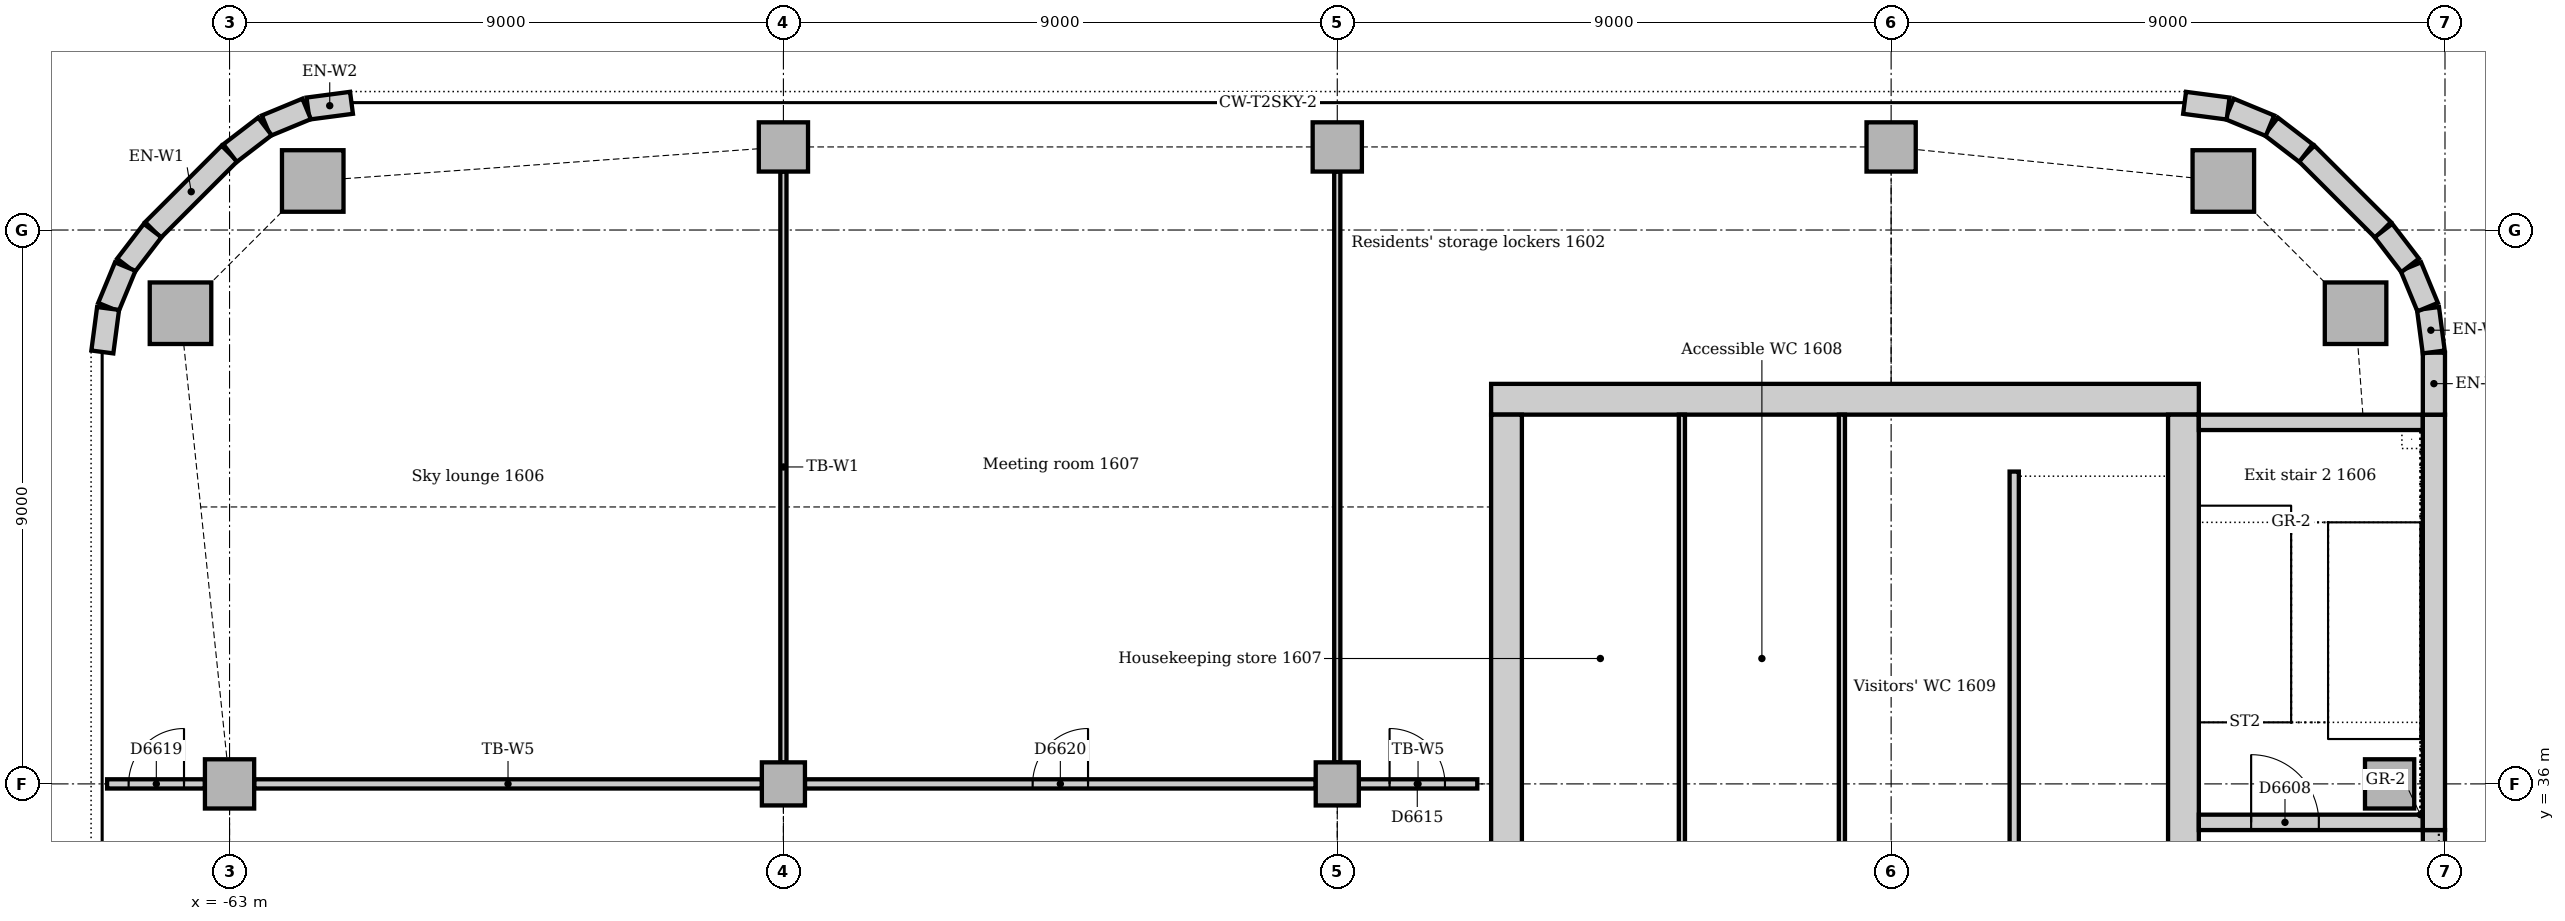
"""IFC4 building model, lengths in metres.
Left out: names, types, materials, properties, quantities, classifications, styles, units other than length and angle.
Written with IfcOpenShell. Run it as: python <this file> out.ifc"""

import sys

from ifc_helpers import new_model, si_unit, direction, frame, frame_2d, origin, origin_2d, place, context, subcontext, project, spatial, rectangle, extrude, element, fill, save


model = new_model("IFC4")
c1 = context("Model", 3, precision=1e-05, world=origin(), true_north=direction((0.0, 1.0)))
c2 = subcontext(c1, "Body", "Model", "MODEL_VIEW")
j1 = project(units=[si_unit("LENGTHUNIT", "METRE"), si_unit("PLANEANGLEUNIT", "RADIAN")], contexts=[c1])
p1 = place(None, origin())
s1 = spatial("IfcSite", under=j1, at=p1, CompositionType="ELEMENT")
p2 = place(p1, origin())
s2 = spatial("IfcBuilding", under=s1, at=p2, CompositionType="ELEMENT")
p3 = place(p2, frame((0.0, 0.0, 71.0)))
s3 = spatial("IfcBuildingStorey", under=s2, at=p3, CompositionType="ELEMENT", Elevation=71.0)
p4 = place(p3, frame((-31.0, 42.25, 0.0), z_axis=(0.0, 0.0, 1.0), x_axis=(-1.0, 0.0, 0.0)))
e1 = element("IfcWall", 1, at=p4, inside=s3, PredefinedType="SOLIDWALL", context=c2, shape_type="SweptSolid", body=[
    extrude(rectangle(XDim=11.5, YDim=0.5, at=frame_2d((5.75, 0.0))), origin(), (0.0, 0.0, 1.0), 4.0),
])
p5 = place(p3, frame((-31.25, 30.5, 0.0), z_axis=(0.0, 0.0, 1.0), x_axis=(0.0, 1.0, 0.0)))
e2 = element("IfcWall", 2, at=p5, inside=s3, PredefinedType="SOLIDWALL", context=c2, shape_type="SweptSolid", body=[
    extrude(rectangle(XDim=11.5, YDim=0.5, at=frame_2d((5.75, 0.0))), origin(), (0.0, 0.0, 1.0), 4.0),
])
p6 = place(p5, frame((0.85, 0.0, 0.0)))
e3 = element("IfcOpeningElement", 3, at=p6, cuts=e2, PredefinedType="OPENING", context=c2, shape_type="SweptSolid", body=[
    extrude(rectangle(XDim=1.8, YDim=2.1, at=frame_2d((0.9, 1.05))), frame((0.0, 0.26, 0.0), z_axis=(0.0, -1.0, 0.0), x_axis=(1.0, 0.0, 0.0)), (0.0, 0.0, 1.0), 0.52),
])
p7 = place(p3, frame((-42.25, 42.0, 0.0), z_axis=(0.0, 0.0, 1.0), x_axis=(0.0, -1.0, 0.0)))
e4 = element("IfcWall", 4, at=p7, inside=s3, PredefinedType="SOLIDWALL", context=c2, shape_type="SweptSolid", body=[
    extrude(rectangle(XDim=11.5, YDim=0.5, at=frame_2d((5.75, 0.0))), origin(), (0.0, 0.0, 1.0), 4.0),
])
p8 = place(p7, frame((8.85, 0.0, 0.0)))
e5 = element("IfcOpeningElement", 5, at=p8, cuts=e4, PredefinedType="OPENING", context=c2, shape_type="SweptSolid", body=[
    extrude(rectangle(XDim=1.8, YDim=2.1, at=frame_2d((0.9, 1.05))), frame((0.0, 0.26, 0.0), z_axis=(0.0, -1.0, 0.0), x_axis=(1.0, 0.0, 0.0)), (0.0, 0.0, 1.0), 0.52),
])
p9 = place(p3, frame((-31.0, 35.375, 0.0), z_axis=(0.0, 0.0, 1.0), x_axis=(1.0, 0.0, 0.0)))
e6 = element("IfcWall", 6, at=p9, inside=s3, PredefinedType="SOLIDWALL", context=c2, shape_type="SweptSolid", body=[
    extrude(rectangle(XDim=3.64, YDim=0.25, at=frame_2d((1.82, 0.0))), origin(), (0.0, 0.0, 1.0), 4.0),
])
p10 = place(p9, frame((0.85, 0.0, 0.0)))
e7 = element("IfcOpeningElement", 7, at=p10, cuts=e6, PredefinedType="OPENING", context=c2, shape_type="SweptSolid", body=[
    extrude(rectangle(XDim=1.1, YDim=2.1, at=frame_2d((0.55, 1.05))), frame((0.0, 0.135, 0.0), z_axis=(0.0, -1.0, 0.0), x_axis=(1.0, 0.0, 0.0)), (0.0, 0.0, 1.0), 0.27),
])
p11 = place(p3, frame((-27.36, 41.875, 0.0), z_axis=(0.0, 0.0, 1.0), x_axis=(-1.0, 0.0, 0.0)))
e8 = element("IfcWall", 8, at=p11, inside=s3, PredefinedType="SOLIDWALL", context=c2, shape_type="SweptSolid", body=[
    extrude(rectangle(XDim=3.64, YDim=0.25, at=frame_2d((1.82, 0.0))), origin(), (0.0, 0.0, 1.0), 4.0),
])
for number, where, z_axis, x_axis in (
    (9, (-28.453, 43.648, 0.0), (0.0, 0.0, 1.0), (1.0, 0.0, 0.0)),
    (10, (-30.602, 45.797, 0.0), (0.0, 0.0, 1.0), (1.0, 0.0, 0.0)),
    (11, (-61.648, 45.797, 0.0), (0.0, 0.0, 1.0), (1.0, 0.0, 0.0)),
    (12, (-63.797, 43.648, 0.0), (0.0, 0.0, 1.0), (1.0, 0.0, 0.0)),
):
    element("IfcColumn", number, at=place(p3, frame(where, z_axis=z_axis, x_axis=x_axis)), inside=s3, PredefinedType="COLUMN", context=c2, shape_type="SweptSolid", body=[
        extrude(rectangle(XDim=1.0, YDim=1.0, at=origin_2d()), origin(), (0.0, 0.0, 1.0), 3.85),
    ])
p12 = place(p3, frame((-27.9, 36.0, 0.0), z_axis=(0.0, 0.0, 1.0), x_axis=(1.0, 0.0, 0.0)))
e13 = element("IfcColumn", 13, at=p12, inside=s3, PredefinedType="COLUMN", context=c2, shape_type="SweptSolid", body=[
    extrude(rectangle(XDim=0.8, YDim=0.8, at=origin_2d()), origin(), (0.0, 0.0, 1.0), 4.0),
])
for number, where, z_axis, x_axis in (
    (14, (-54.0, 46.35, 0.0), (0.0, 0.0, 1.0), (1.0, 0.0, 0.0)),
    (15, (-45.0, 46.35, 0.0), (0.0, 0.0, 1.0), (1.0, 0.0, 0.0)),
    (16, (-36.0, 46.35, 0.0), (0.0, 0.0, 1.0), (1.0, 0.0, 0.0)),
    (17, (-63.0, 36.0, 0.0), (0.0, 0.0, 1.0), (1.0, 0.0, 0.0)),
):
    element("IfcColumn", number, at=place(p3, frame(where, z_axis=z_axis, x_axis=x_axis)), inside=s3, PredefinedType="COLUMN", context=c2, shape_type="SweptSolid", body=[
        extrude(rectangle(XDim=0.8, YDim=0.8, at=origin_2d()), origin(), (0.0, 0.0, 1.0), 3.85),
    ])
for number, where, z_axis, x_axis in (
    (18, (-54.0, 36.0, 0.0), (0.0, 0.0, 1.0), (1.0, 0.0, 0.0)),
    (19, (-45.0, 36.0, 0.0), (0.0, 0.0, 1.0), (1.0, 0.0, 0.0)),
):
    element("IfcColumn", number, at=place(p3, frame(where, z_axis=z_axis, x_axis=x_axis)), inside=s3, PredefinedType="COLUMN", context=c2, shape_type="SweptSolid", body=[
        extrude(rectangle(XDim=0.7, YDim=0.7, at=origin_2d()), origin(), (0.0, 0.0, 1.0), 3.85),
    ])
p13 = place(p3, frame((-27.18, 34.5, 0.0), z_axis=(0.0, 0.0, 1.0), x_axis=(0.0, 1.0, 0.0)))
e20 = element("IfcWall", 20, at=p13, inside=s3, PredefinedType="STANDARD", context=c2, shape_type="SweptSolid", body=[
    extrude(rectangle(XDim=0.75, YDim=0.36, at=frame_2d((0.375, 0.0))), origin(), (0.0, 0.0, 1.0), 3.85),
])
p14 = place(p3, frame((-27.18, 35.25, 0.0), z_axis=(0.0, 0.0, 1.0), x_axis=(0.0, 1.0, 0.0)))
e21 = element("IfcWall", 21, at=p14, inside=s3, PredefinedType="STANDARD", context=c2, shape_type="SweptSolid", body=[
    extrude(rectangle(XDim=6.75, YDim=0.36, at=frame_2d((3.375, 0.0))), origin(), (0.0, 0.0, 1.0), 3.85),
])
p15 = place(p3, frame((-27.18, 42.0, 0.0), z_axis=(0.0, 0.0, 1.0), x_axis=(0.0, 1.0, 0.0)))
e22 = element("IfcWall", 22, at=p15, inside=s3, PredefinedType="STANDARD", context=c2, shape_type="SweptSolid", body=[
    extrude(rectangle(XDim=1.007, YDim=0.36, at=frame_2d((0.504, 0.0))), origin(), (0.0, 0.0, 1.0), 3.85),
])
for number, where, z_axis, x_axis in (
    (23, (-28.006, 45.001, 0.0), (0.0, 0.0, 1.0), (-0.707, 0.707, 0.0)),
    (24, (-63.001, 46.244, 0.0), (0.0, 0.0, 1.0), (-0.707, -0.707, 0.0)),
):
    element("IfcWall", number, at=place(p3, frame(where, z_axis=z_axis, x_axis=x_axis)), inside=s3, PredefinedType="STANDARD", context=c2, shape_type="SweptSolid", body=[
        extrude(rectangle(XDim=1.757, YDim=0.36, at=frame_2d((0.879, 0.0))), origin(), (0.0, 0.0, 1.0), 3.85),
    ])
for number, where, z_axis, x_axis in (
    (25, (-27.183, 43.019, 0.0), (0.0, 0.0, 1.0), (-0.131, 0.991, 0.0)),
    (26, (-27.282, 43.747, 0.0), (0.0, 0.0, 1.0), (-0.383, 0.924, 0.0)),
):
    element("IfcWall", number, at=place(p3, frame(where, z_axis=z_axis, x_axis=x_axis)), inside=s3, PredefinedType="STANDARD", context=c2, shape_type="SweptSolid", body=[
        extrude(rectangle(XDim=0.713, YDim=0.36, at=frame_2d((0.356, 0.0))), origin(), (0.0, 0.0, 1.0), 3.85),
    ])
for number, where, z_axis, x_axis in (
    (27, (-27.566, 44.425, 0.0), (0.0, 0.0, 1.0), (-0.609, 0.793, 0.0)),
    (28, (-29.259, 46.25, 0.0), (0.0, 0.0, 1.0), (-0.793, 0.609, 0.0)),
):
    element("IfcWall", number, at=place(p3, frame(where, z_axis=z_axis, x_axis=x_axis)), inside=s3, PredefinedType="STANDARD", context=c2, shape_type="SweptSolid", body=[
        extrude(rectangle(XDim=0.713, YDim=0.36, at=frame_2d((0.357, 0.0))), origin(), (0.0, 0.0, 1.0), 3.85),
    ])
for number, where, z_axis, x_axis in (
    (29, (-29.844, 46.695, 0.0), (0.0, 0.0, 1.0), (-0.924, 0.383, 0.0)),
    (30, (-30.524, 46.974, 0.0), (0.0, 0.0, 1.0), (-0.991, 0.131, 0.0)),
    (31, (-61.019, 47.067, 0.0), (0.0, 0.0, 1.0), (-0.991, -0.131, 0.0)),
    (32, (-61.747, 46.968, 0.0), (0.0, 0.0, 1.0), (-0.924, -0.383, 0.0)),
):
    element("IfcWall", number, at=place(p3, frame(where, z_axis=z_axis, x_axis=x_axis)), inside=s3, PredefinedType="STANDARD", context=c2, shape_type="SweptSolid", body=[
        extrude(rectangle(XDim=0.713, YDim=0.36, at=frame_2d((0.356, 0.0))), origin(), (0.0, 0.0, 1.0), 3.85),
    ])
for number, where, z_axis, x_axis in (
    (33, (-62.425, 46.684, 0.0), (0.0, 0.0, 1.0), (-0.793, -0.609, 0.0)),
    (34, (-64.25, 44.991, 0.0), (0.0, 0.0, 1.0), (-0.609, -0.793, 0.0)),
):
    element("IfcWall", number, at=place(p3, frame(where, z_axis=z_axis, x_axis=x_axis)), inside=s3, PredefinedType="STANDARD", context=c2, shape_type="SweptSolid", body=[
        extrude(rectangle(XDim=0.713, YDim=0.36, at=frame_2d((0.357, 0.0))), origin(), (0.0, 0.0, 1.0), 3.85),
    ])
for number, where, z_axis, x_axis in (
    (35, (-64.695, 44.406, 0.0), (0.0, 0.0, 1.0), (-0.383, -0.924, 0.0)),
    (36, (-64.974, 43.726, 0.0), (0.0, 0.0, 1.0), (-0.131, -0.991, 0.0)),
):
    element("IfcWall", number, at=place(p3, frame(where, z_axis=z_axis, x_axis=x_axis)), inside=s3, PredefinedType="STANDARD", context=c2, shape_type="SweptSolid", body=[
        extrude(rectangle(XDim=0.713, YDim=0.36, at=frame_2d((0.356, 0.0))), origin(), (0.0, 0.0, 1.0), 3.85),
    ])
p16 = place(p3, frame((-34.0, 41.075, 0.0), z_axis=(0.0, 0.0, 1.0), x_axis=(0.0, -1.0, 0.0)))
e37 = element("IfcWall", 37, at=p16, inside=s3, PredefinedType="SOLIDWALL", context=c2, shape_type="SweptSolid", body=[
    extrude(rectangle(XDim=7.0, YDim=0.15, at=frame_2d((3.5, 0.0))), origin(), (0.0, 0.0, 1.0), 4.0),
])
for number, where, z_axis, x_axis in (
    (38, (-39.4, 34.075, 0.0), (0.0, 0.0, 1.0), (0.0, 1.0, 0.0)),
    (39, (-36.8, 34.075, 0.0), (0.0, 0.0, 1.0), (0.0, 1.0, 0.0)),
):
    element("IfcWall", number, at=place(p3, frame(where, z_axis=z_axis, x_axis=x_axis)), inside=s3, PredefinedType="PARTITIONING", context=c2, shape_type="SweptSolid", body=[
        extrude(rectangle(XDim=7.925, YDim=0.1, at=frame_2d((3.962, 0.0))), origin(), (0.0, 0.0, 1.0), 3.85),
    ])
p17 = place(p3, frame((-44.65, 36.0, 0.0), z_axis=(0.0, 0.0, 1.0), x_axis=(1.0, 0.0, 0.0)))
e40 = element("IfcWall", 40, at=p17, inside=s3, PredefinedType="PARTITIONING", context=c2, shape_type="SweptSolid", body=[
    extrude(rectangle(XDim=1.925, YDim=0.15, at=frame_2d((0.963, 0.0))), origin(), (0.0, 0.0, 1.0), 3.602),
])
p18 = place(p17, frame((0.5, 0.0, 0.0)))
e41 = element("IfcOpeningElement", 41, at=p18, cuts=e40, PredefinedType="OPENING", context=c2, shape_type="SweptSolid", body=[
    extrude(rectangle(XDim=0.9, YDim=2.1, at=frame_2d((0.45, 1.05))), frame((0.0, 0.085, 0.0), z_axis=(0.0, -1.0, 0.0), x_axis=(1.0, 0.0, 0.0)), (0.0, 0.0, 1.0), 0.17),
])
p19 = place(p3, frame((-53.65, 36.0, 0.0), z_axis=(0.0, 0.0, 1.0), x_axis=(1.0, 0.0, 0.0)))
e42 = element("IfcWall", 42, at=p19, inside=s3, PredefinedType="PARTITIONING", context=c2, shape_type="SweptSolid", body=[
    extrude(rectangle(XDim=8.3, YDim=0.15, at=frame_2d((4.15, 0.0))), origin(), (0.0, 0.0, 1.0), 3.158),
])
p20 = place(p19, frame((3.7, 0.0, 0.0)))
e43 = element("IfcOpeningElement", 43, at=p20, cuts=e42, PredefinedType="OPENING", context=c2, shape_type="SweptSolid", body=[
    extrude(rectangle(XDim=0.9, YDim=2.1, at=frame_2d((0.45, 1.05))), frame((0.0, 0.085, 0.0), z_axis=(0.0, -1.0, 0.0), x_axis=(1.0, 0.0, 0.0)), (0.0, 0.0, 1.0), 0.17),
])
p21 = place(p3, frame((-62.6, 36.0, 0.0), z_axis=(0.0, 0.0, 1.0), x_axis=(1.0, 0.0, 0.0)))
e44 = element("IfcWall", 44, at=p21, inside=s3, PredefinedType="PARTITIONING", context=c2, shape_type="SweptSolid", body=[
    extrude(rectangle(XDim=8.25, YDim=0.15, at=frame_2d((4.125, 0.0))), origin(), (0.0, 0.0, 1.0), 3.158),
])
p22 = place(p3, frame((-64.99, 36.0, 0.0), z_axis=(0.0, 0.0, 1.0), x_axis=(1.0, 0.0, 0.0)))
e45 = element("IfcWall", 45, at=p22, inside=s3, PredefinedType="PARTITIONING", context=c2, shape_type="SweptSolid", body=[
    extrude(rectangle(XDim=1.59, YDim=0.15, at=frame_2d((0.795, 0.0))), origin(), (0.0, 0.0, 1.0), 3.85),
])
p23 = place(p22, frame((0.35, 0.0, 0.0)))
e46 = element("IfcOpeningElement", 46, at=p23, cuts=e45, PredefinedType="OPENING", context=c2, shape_type="SweptSolid", body=[
    extrude(rectangle(XDim=0.9, YDim=2.1, at=frame_2d((0.45, 1.05))), frame((0.0, 0.085, 0.0), z_axis=(0.0, -1.0, 0.0), x_axis=(1.0, 0.0, 0.0)), (0.0, 0.0, 1.0), 0.17),
])
for number, where, z_axis, x_axis in (
    (47, (-54.0, 36.35, 0.0), (0.0, 0.0, 1.0), (0.0, 1.0, 0.0)),
    (48, (-45.0, 36.35, 0.0), (0.0, 0.0, 1.0), (0.0, 1.0, 0.0)),
):
    element("IfcWall", number, at=place(p3, frame(where, z_axis=z_axis, x_axis=x_axis)), inside=s3, PredefinedType="PARTITIONING", context=c2, shape_type="SweptSolid", body=[
        extrude(rectangle(XDim=9.6, YDim=0.1, at=frame_2d((4.8, 0.0))), origin(), (0.0, 0.0, 1.0), 3.256),
    ])
p24 = place(p10, origin())
e49 = element("IfcDoor", 49, at=p24, inside=s3, OperationType="SINGLE_SWING_LEFT", PredefinedType="DOOR", context=c2, shape_type="SweptSolid", body=[
    extrude(rectangle(XDim=1.1, YDim=2.1, at=frame_2d((0.55, 1.05))), frame((0.0, 0.025, 0.0), z_axis=(0.0, -1.0, 0.0), x_axis=(1.0, 0.0, 0.0)), (0.0, 0.0, 1.0), 0.05),
])
fill(e7, e49)
p25 = place(p18, origin())
e50 = element("IfcDoor", 50, at=p25, inside=s3, OperationType="SINGLE_SWING_LEFT", PredefinedType="DOOR", context=c2, shape_type="SweptSolid", body=[
    extrude(rectangle(XDim=0.9, YDim=2.1, at=frame_2d((0.45, 1.05))), frame((0.0, 0.025, 0.0), z_axis=(0.0, -1.0, 0.0), x_axis=(1.0, 0.0, 0.0)), (0.0, 0.0, 1.0), 0.05),
])
fill(e41, e50)
p26 = place(p23, origin())
e51 = element("IfcDoor", 51, at=p26, inside=s3, OperationType="SINGLE_SWING_RIGHT", PredefinedType="DOOR", context=c2, shape_type="SweptSolid", body=[
    extrude(rectangle(XDim=0.9, YDim=2.1, at=frame_2d((0.45, 1.05))), frame((0.0, 0.025, 0.0), z_axis=(0.0, -1.0, 0.0), x_axis=(1.0, 0.0, 0.0)), (0.0, 0.0, 1.0), 0.05),
])
fill(e46, e51)
p27 = place(p20, origin())
e52 = element("IfcDoor", 52, at=p27, inside=s3, OperationType="SINGLE_SWING_RIGHT", PredefinedType="DOOR", context=c2, shape_type="SweptSolid", body=[
    extrude(rectangle(XDim=0.9, YDim=2.1, at=frame_2d((0.45, 1.05))), frame((0.0, 0.025, 0.0), z_axis=(0.0, -1.0, 0.0), x_axis=(1.0, 0.0, 0.0)), (0.0, 0.0, 1.0), 0.05),
])
fill(e43, e52)
save(model, sys.argv[1])
